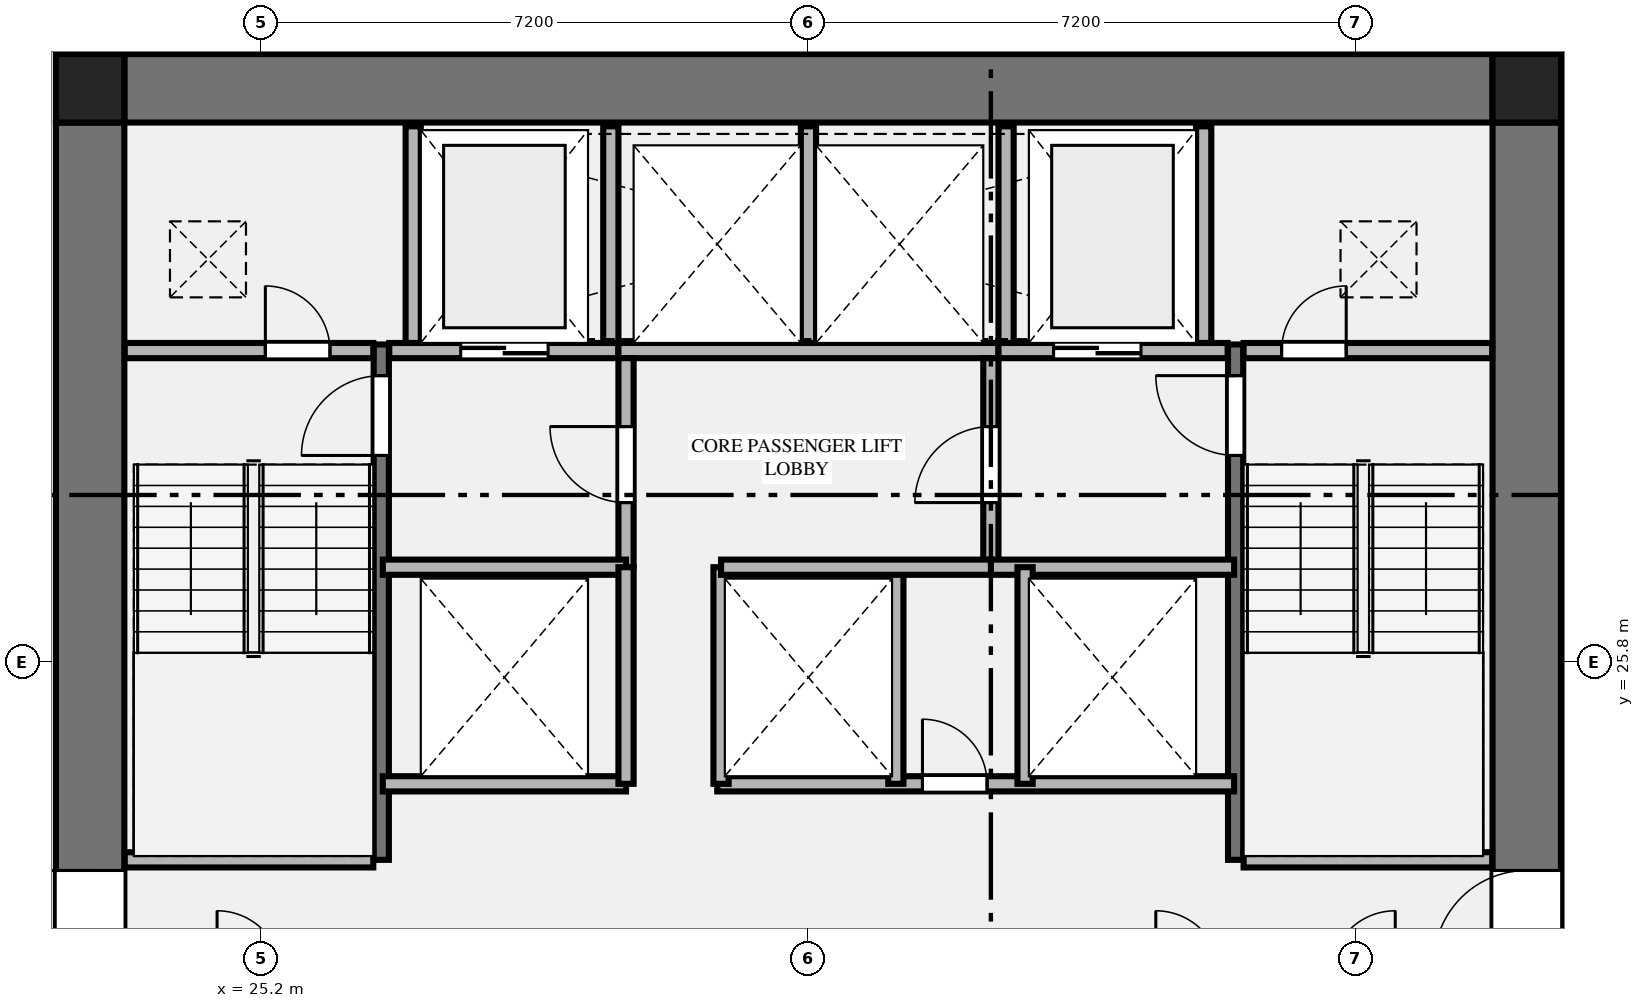
"""IFC4 building model, lengths in metres.
Left out: names, types, materials, properties, quantities, classifications, styles, units other than length and angle.
Written with IfcOpenShell. Run it as: python <this file> out.ifc"""

import sys

from ifc_helpers import new_model, si_unit, direction, frame, frame_2d, origin, origin_2d, place, context, subcontext, project, spatial, rectangle, extrude, element, fill, save


model = new_model("IFC4")
c1 = context("Model", 3, precision=1e-05, world=origin(), true_north=direction((0.0, 1.0)))
c2 = subcontext(c1, "Body", "Model", "MODEL_VIEW")
j1 = project(units=[si_unit("LENGTHUNIT", "METRE"), si_unit("PLANEANGLEUNIT", "RADIAN")], contexts=[c1])
p1 = place(None, origin())
s1 = spatial("IfcSite", under=j1, at=p1, CompositionType="ELEMENT")
p2 = place(p1, origin())
s2 = spatial("IfcBuilding", under=s1, at=p2, CompositionType="ELEMENT")
p3 = place(p2, frame((0.0, 0.0, 24.9)))
s3 = spatial("IfcBuildingStorey", under=s2, at=p3, CompositionType="ELEMENT", Elevation=24.9)
for number, where, z_axis, x_axis in (
    (1, (41.85, 33.35, 0.0), (0.0, 0.0, 1.0), (1.0, 0.0, 0.0)),
    (2, (22.95, 33.35, 0.0), (0.0, 0.0, 1.0), (1.0, 0.0, 0.0)),
):
    element("IfcColumn", number, at=place(p3, frame(where, z_axis=z_axis, x_axis=x_axis)), inside=s3, PredefinedType="COLUMN", context=c2, shape_type="SweptSolid", body=[
        extrude(rectangle(XDim=0.9, YDim=0.9, at=origin_2d()), origin(), (0.0, 0.0, 1.0), 3.55),
    ])
p4 = place(p3, frame((23.4, 33.35, 0.0), z_axis=(0.0, 0.0, 1.0), x_axis=(1.0, 0.0, 0.0)))
e3 = element("IfcWall", 3, at=p4, inside=s3, PredefinedType="SHEAR", context=c2, shape_type="SweptSolid", body=[
    extrude(rectangle(XDim=18.0, YDim=0.9, at=frame_2d((9.0, 0.0))), origin(), (0.0, 0.0, 1.0), 3.33),
])
p5 = place(p3, frame((22.95, 18.9, 0.0), z_axis=(0.0, 0.0, 1.0), x_axis=(0.0, 1.0, 0.0)))
e4 = element("IfcWall", 4, at=p5, inside=s3, PredefinedType="SHEAR", context=c2, shape_type="SweptSolid", body=[
    extrude(rectangle(XDim=14.0, YDim=0.9, at=frame_2d((7.0, 0.0))), origin(), (0.0, 0.0, 1.0), 3.33),
])
p6 = place(p5, frame((2.94, 0.0, 0.0)))
e5 = element("IfcOpeningElement", 5, at=p6, cuts=e4, PredefinedType="OPENING", context=c2, shape_type="SweptSolid", body=[
    extrude(rectangle(XDim=1.22, YDim=2.25, at=frame_2d((0.61, 1.125))), frame((0.0, 0.46, 0.0), z_axis=(0.0, -1.0, 0.0), x_axis=(1.0, 0.0, 0.0)), (0.0, 0.0, 1.0), 0.92),
])
p7 = place(p3, frame((41.85, 18.9, 0.0), z_axis=(0.0, 0.0, 1.0), x_axis=(0.0, 1.0, 0.0)))
e6 = element("IfcWall", 6, at=p7, inside=s3, PredefinedType="SHEAR", context=c2, shape_type="SweptSolid", body=[
    extrude(rectangle(XDim=14.0, YDim=0.9, at=frame_2d((7.0, 0.0))), origin(), (0.0, 0.0, 1.0), 3.33),
])
p8 = place(p7, frame((2.94, 0.0, 0.0)))
e7 = element("IfcOpeningElement", 7, at=p8, cuts=e6, PredefinedType="OPENING", context=c2, shape_type="SweptSolid", body=[
    extrude(rectangle(XDim=1.22, YDim=2.25, at=frame_2d((0.61, 1.125))), frame((0.0, 0.46, 0.0), z_axis=(0.0, -1.0, 0.0), x_axis=(1.0, 0.0, 0.0)), (0.0, 0.0, 1.0), 0.92),
])
p9 = place(p3, frame((26.78, 23.2, 0.0), z_axis=(0.0, 0.0, 1.0), x_axis=(0.0, 1.0, 0.0)))
e8 = element("IfcWall", 8, at=p9, inside=s3, PredefinedType="SHEAR", context=c2, shape_type="SweptSolid", body=[
    extrude(rectangle(XDim=6.78, YDim=0.2, at=frame_2d((3.39, 0.0))), origin(), (0.0, 0.0, 1.0), 3.55),
])
p10 = place(p9, frame((5.32, 0.0, 0.0)))
e9 = element("IfcOpeningElement", 9, at=p10, cuts=e8, PredefinedType="OPENING", context=c2, shape_type="SweptSolid", body=[
    extrude(rectangle(XDim=1.05, YDim=2.15, at=frame_2d((0.525, 1.075))), frame((0.0, 0.11, 0.0), z_axis=(0.0, -1.0, 0.0), x_axis=(1.0, 0.0, 0.0)), (0.0, 0.0, 1.0), 0.22),
])
p11 = place(p3, frame((23.405, 23.2, 0.0), z_axis=(0.0, 0.0, 1.0), x_axis=(1.0, 0.0, 0.0)))
e10 = element("IfcWall", 10, at=p11, inside=s3, PredefinedType="PLUMBINGWALL", context=c2, shape_type="SweptSolid", body=[
    extrude(rectangle(XDim=3.27, YDim=0.2, at=frame_2d((1.635, 0.0))), origin(), (0.0, 0.0, 1.0), 3.33),
])
p12 = place(p3, frame((38.02, 23.2, 0.0), z_axis=(0.0, 0.0, 1.0), x_axis=(0.0, 1.0, 0.0)))
e11 = element("IfcWall", 11, at=p12, inside=s3, PredefinedType="SHEAR", context=c2, shape_type="SweptSolid", body=[
    extrude(rectangle(XDim=6.78, YDim=0.2, at=frame_2d((3.39, 0.0))), origin(), (0.0, 0.0, 1.0), 3.55),
])
p13 = place(p12, frame((5.32, 0.0, 0.0)))
e12 = element("IfcOpeningElement", 12, at=p13, cuts=e11, PredefinedType="OPENING", context=c2, shape_type="SweptSolid", body=[
    extrude(rectangle(XDim=1.05, YDim=2.15, at=frame_2d((0.525, 1.075))), frame((0.0, 0.11, 0.0), z_axis=(0.0, -1.0, 0.0), x_axis=(1.0, 0.0, 0.0)), (0.0, 0.0, 1.0), 0.22),
])
p14 = place(p3, frame((38.125, 23.2, 0.0), z_axis=(0.0, 0.0, 1.0), x_axis=(1.0, 0.0, 0.0)))
e13 = element("IfcWall", 13, at=p14, inside=s3, PredefinedType="PLUMBINGWALL", context=c2, shape_type="SweptSolid", body=[
    extrude(rectangle(XDim=3.27, YDim=0.2, at=frame_2d((1.635, 0.0))), origin(), (0.0, 0.0, 1.0), 3.33),
])
p15 = place(p3, frame((23.405, 29.9, 0.0), z_axis=(0.0, 0.0, 1.0), x_axis=(1.0, 0.0, 0.0)))
e14 = element("IfcWall", 14, at=p15, inside=s3, PredefinedType="PLUMBINGWALL", context=c2, shape_type="SweptSolid", body=[
    extrude(rectangle(XDim=3.27, YDim=0.2, at=frame_2d((1.635, 0.0))), origin(), (0.0, 0.0, 1.0), 3.33),
])
p16 = place(p15, frame((1.85, 0.0, 0.0)))
e15 = element("IfcOpeningElement", 15, at=p16, cuts=e14, PredefinedType="OPENING", context=c2, shape_type="SweptSolid", body=[
    extrude(rectangle(XDim=0.85, YDim=2.05, at=frame_2d((0.425, 1.025))), frame((0.0, 0.11, 0.0), z_axis=(0.0, -1.0, 0.0), x_axis=(1.0, 0.0, 0.0)), (0.0, 0.0, 1.0), 0.22),
])
p17 = place(p3, frame((26.885, 29.9, 0.0), z_axis=(0.0, 0.0, 1.0), x_axis=(1.0, 0.0, 0.0)))
e16 = element("IfcWall", 16, at=p17, inside=s3, PredefinedType="PLUMBINGWALL", context=c2, shape_type="SweptSolid", body=[
    extrude(rectangle(XDim=3.015, YDim=0.2, at=frame_2d((1.507, 0.0))), origin(), (0.0, 0.0, 1.0), 3.33),
])
p18 = place(p17, frame((0.94, 0.0, 0.0)))
e17 = element("IfcOpeningElement", 17, at=p18, cuts=e16, PredefinedType="OPENING", context=c2, shape_type="SweptSolid", body=[
    extrude(rectangle(XDim=1.15, YDim=2.2, at=frame_2d((0.575, 1.1))), frame((0.0, 0.11, 0.0), z_axis=(0.0, -1.0, 0.0), x_axis=(1.0, 0.0, 0.0)), (0.0, 0.0, 1.0), 0.22),
])
p19 = place(p3, frame((29.9, 29.9, 0.0), z_axis=(0.0, 0.0, 1.0), x_axis=(1.0, 0.0, 0.0)))
e18 = element("IfcWall", 18, at=p19, inside=s3, PredefinedType="PLUMBINGWALL", context=c2, shape_type="SweptSolid", body=[
    extrude(rectangle(XDim=5.0, YDim=0.2, at=frame_2d((2.5, 0.0))), origin(), (0.0, 0.0, 1.0), 3.33),
])
p20 = place(p3, frame((34.9, 29.9, 0.0), z_axis=(0.0, 0.0, 1.0), x_axis=(1.0, 0.0, 0.0)))
e19 = element("IfcWall", 19, at=p20, inside=s3, PredefinedType="PLUMBINGWALL", context=c2, shape_type="SweptSolid", body=[
    extrude(rectangle(XDim=3.015, YDim=0.2, at=frame_2d((1.508, 0.0))), origin(), (0.0, 0.0, 1.0), 3.33),
])
p21 = place(p20, frame((0.725, 0.0, 0.0)))
e20 = element("IfcOpeningElement", 20, at=p21, cuts=e19, PredefinedType="OPENING", context=c2, shape_type="SweptSolid", body=[
    extrude(rectangle(XDim=1.15, YDim=2.2, at=frame_2d((0.575, 1.1))), frame((0.0, 0.11, 0.0), z_axis=(0.0, -1.0, 0.0), x_axis=(1.0, 0.0, 0.0)), (0.0, 0.0, 1.0), 0.22),
])
p22 = place(p3, frame((38.125, 29.9, 0.0), z_axis=(0.0, 0.0, 1.0), x_axis=(1.0, 0.0, 0.0)))
e21 = element("IfcWall", 21, at=p22, inside=s3, PredefinedType="PLUMBINGWALL", context=c2, shape_type="SweptSolid", body=[
    extrude(rectangle(XDim=3.27, YDim=0.2, at=frame_2d((1.635, 0.0))), origin(), (0.0, 0.0, 1.0), 3.33),
])
p23 = place(p22, frame((0.5, 0.0, 0.0)))
e22 = element("IfcOpeningElement", 22, at=p23, cuts=e21, PredefinedType="OPENING", context=c2, shape_type="SweptSolid", body=[
    extrude(rectangle(XDim=0.85, YDim=2.05, at=frame_2d((0.425, 1.025))), frame((0.0, 0.11, 0.0), z_axis=(0.0, -1.0, 0.0), x_axis=(1.0, 0.0, 0.0)), (0.0, 0.0, 1.0), 0.22),
])
for number, where, z_axis, x_axis in (
    (23, (27.2, 30.0, 0.0), (0.0, 0.0, 1.0), (0.0, 1.0, 0.0)),
    (24, (29.8, 30.0, 0.0), (0.0, 0.0, 1.0), (0.0, 1.0, 0.0)),
    (25, (32.4, 30.0, 0.0), (0.0, 0.0, 1.0), (0.0, 1.0, 0.0)),
    (26, (35.0, 30.0, 0.0), (0.0, 0.0, 1.0), (0.0, 1.0, 0.0)),
    (27, (37.6, 30.0, 0.0), (0.0, 0.0, 1.0), (0.0, 1.0, 0.0)),
):
    element("IfcWall", number, at=place(p3, frame(where, z_axis=z_axis, x_axis=x_axis)), inside=s3, PredefinedType="PLUMBINGWALL", context=c2, shape_type="SweptSolid", body=[
        extrude(rectangle(XDim=2.85, YDim=0.2, at=frame_2d((1.425, 0.0))), origin(), (0.0, 0.0, 1.0), 3.33),
    ])
p24 = place(p3, frame((30.0, 27.05, 0.0), z_axis=(0.0, 0.0, 1.0), x_axis=(0.0, 1.0, 0.0)))
e28 = element("IfcWall", 28, at=p24, inside=s3, PredefinedType="PLUMBINGWALL", context=c2, shape_type="SweptSolid", body=[
    extrude(rectangle(XDim=2.75, YDim=0.2, at=frame_2d((1.375, 0.0))), origin(), (0.0, 0.0, 1.0), 3.33),
])
p25 = place(p24, frame((0.85, 0.0, 0.0)))
e29 = element("IfcOpeningElement", 29, at=p25, cuts=e28, PredefinedType="OPENING", context=c2, shape_type="SweptSolid", body=[
    extrude(rectangle(XDim=1.0, YDim=2.15, at=frame_2d((0.5, 1.075))), frame((0.0, 0.11, 0.0), z_axis=(0.0, -1.0, 0.0), x_axis=(1.0, 0.0, 0.0)), (0.0, 0.0, 1.0), 0.22),
])
p26 = place(p3, frame((26.8, 27.05, 0.0), z_axis=(0.0, 0.0, 1.0), x_axis=(1.0, 0.0, 0.0)))
e30 = element("IfcWall", 30, at=p26, inside=s3, PredefinedType="PLUMBINGWALL", context=c2, shape_type="SweptSolid", body=[
    extrude(rectangle(XDim=3.2, YDim=0.2, at=frame_2d((1.6, 0.0))), origin(), (0.0, 0.0, 1.0), 3.33),
])
p27 = place(p3, frame((34.8, 27.05, 0.0), z_axis=(0.0, 0.0, 1.0), x_axis=(0.0, 1.0, 0.0)))
e31 = element("IfcWall", 31, at=p27, inside=s3, PredefinedType="PLUMBINGWALL", context=c2, shape_type="SweptSolid", body=[
    extrude(rectangle(XDim=2.75, YDim=0.2, at=frame_2d((1.375, 0.0))), origin(), (0.0, 0.0, 1.0), 3.33),
])
p28 = place(p27, frame((0.85, 0.0, 0.0)))
e32 = element("IfcOpeningElement", 32, at=p28, cuts=e31, PredefinedType="OPENING", context=c2, shape_type="SweptSolid", body=[
    extrude(rectangle(XDim=1.0, YDim=2.15, at=frame_2d((0.5, 1.075))), frame((0.0, 0.11, 0.0), z_axis=(0.0, -1.0, 0.0), x_axis=(1.0, 0.0, 0.0)), (0.0, 0.0, 1.0), 0.22),
])
for number, where, z_axis, x_axis in (
    (33, (34.8, 27.05, 0.0), (0.0, 0.0, 1.0), (1.0, 0.0, 0.0)),
    (34, (26.8, 24.2, 0.0), (0.0, 0.0, 1.0), (1.0, 0.0, 0.0)),
):
    element("IfcWall", number, at=place(p3, frame(where, z_axis=z_axis, x_axis=x_axis)), inside=s3, PredefinedType="PLUMBINGWALL", context=c2, shape_type="SweptSolid", body=[
        extrude(rectangle(XDim=3.2, YDim=0.2, at=frame_2d((1.6, 0.0))), origin(), (0.0, 0.0, 1.0), 3.33),
    ])
p29 = place(p3, frame((30.0, 24.2, 0.0), z_axis=(0.0, 0.0, 1.0), x_axis=(0.0, 1.0, 0.0)))
e35 = element("IfcWall", 35, at=p29, inside=s3, PredefinedType="PLUMBINGWALL", context=c2, shape_type="SweptSolid", body=[
    extrude(rectangle(XDim=2.85, YDim=0.2, at=frame_2d((1.425, 0.0))), origin(), (0.0, 0.0, 1.0), 3.33),
])
p30 = place(p3, frame((31.2, 24.2, 0.0), z_axis=(0.0, 0.0, 1.0), x_axis=(1.0, 0.0, 0.0)))
e36 = element("IfcWall", 36, at=p30, inside=s3, PredefinedType="PLUMBINGWALL", context=c2, shape_type="SweptSolid", body=[
    extrude(rectangle(XDim=6.8, YDim=0.2, at=frame_2d((3.4, 0.0))), origin(), (0.0, 0.0, 1.0), 3.33),
])
p31 = place(p30, frame((2.7, 0.0, 0.0)))
e37 = element("IfcOpeningElement", 37, at=p31, cuts=e36, PredefinedType="OPENING", context=c2, shape_type="SweptSolid", body=[
    extrude(rectangle(XDim=0.85, YDim=2.05, at=frame_2d((0.425, 1.025))), frame((0.0, 0.11, 0.0), z_axis=(0.0, -1.0, 0.0), x_axis=(1.0, 0.0, 0.0)), (0.0, 0.0, 1.0), 0.22),
])
for number, where, z_axis, x_axis in (
    (38, (31.25, 24.2, 0.0), (0.0, 0.0, 1.0), (0.0, 1.0, 0.0)),
    (39, (33.55, 24.2, 0.0), (0.0, 0.0, 1.0), (0.0, 1.0, 0.0)),
    (40, (35.25, 24.2, 0.0), (0.0, 0.0, 1.0), (0.0, 1.0, 0.0)),
):
    element("IfcWall", number, at=place(p3, frame(where, z_axis=z_axis, x_axis=x_axis)), inside=s3, PredefinedType="PLUMBINGWALL", context=c2, shape_type="SweptSolid", body=[
        extrude(rectangle(XDim=2.85, YDim=0.2, at=frame_2d((1.425, 0.0))), origin(), (0.0, 0.0, 1.0), 3.33),
    ])
p32 = place(p3, frame((31.25, 27.05, 0.0), z_axis=(0.0, 0.0, 1.0), x_axis=(1.0, 0.0, 0.0)))
e41 = element("IfcWall", 41, at=p32, inside=s3, PredefinedType="PLUMBINGWALL", context=c2, shape_type="SweptSolid", body=[
    extrude(rectangle(XDim=3.55, YDim=0.2, at=frame_2d((1.775, 0.0))), origin(), (0.0, 0.0, 1.0), 3.33),
])
p33 = place(p6, origin())
e42 = element("IfcDoor", 42, at=p33, inside=s3, OperationType="SINGLE_SWING_RIGHT", PredefinedType="DOOR", context=c2, shape_type="SweptSolid", body=[
    extrude(rectangle(XDim=1.22, YDim=2.25, at=frame_2d((0.61, 1.125))), frame((0.0, 0.025, 0.0), z_axis=(0.0, -1.0, 0.0), x_axis=(1.0, 0.0, 0.0)), (0.0, 0.0, 1.0), 0.05),
])
fill(e5, e42)
p34 = place(p8, origin())
e43 = element("IfcDoor", 43, at=p34, inside=s3, OperationType="SINGLE_SWING_LEFT", PredefinedType="DOOR", context=c2, shape_type="SweptSolid", body=[
    extrude(rectangle(XDim=1.22, YDim=2.25, at=frame_2d((0.61, 1.125))), frame((0.0, 0.025, 0.0), z_axis=(0.0, -1.0, 0.0), x_axis=(1.0, 0.0, 0.0)), (0.0, 0.0, 1.0), 0.05),
])
fill(e7, e43)
p35 = place(p10, origin())
e44 = element("IfcDoor", 44, at=p35, inside=s3, OperationType="SINGLE_SWING_LEFT", PredefinedType="DOOR", context=c2, shape_type="SweptSolid", body=[
    extrude(rectangle(XDim=1.05, YDim=2.15, at=frame_2d((0.525, 1.075))), frame((0.0, 0.025, 0.0), z_axis=(0.0, -1.0, 0.0), x_axis=(1.0, 0.0, 0.0)), (0.0, 0.0, 1.0), 0.05),
])
fill(e9, e44)
p36 = place(p13, origin())
e45 = element("IfcDoor", 45, at=p36, inside=s3, OperationType="SINGLE_SWING_RIGHT", PredefinedType="DOOR", context=c2, shape_type="SweptSolid", body=[
    extrude(rectangle(XDim=1.05, YDim=2.15, at=frame_2d((0.525, 1.075))), frame((0.0, 0.025, 0.0), z_axis=(0.0, -1.0, 0.0), x_axis=(1.0, 0.0, 0.0)), (0.0, 0.0, 1.0), 0.05),
])
fill(e12, e45)
p37 = place(p16, origin())
e46 = element("IfcDoor", 46, at=p37, inside=s3, OperationType="SINGLE_SWING_LEFT", PredefinedType="DOOR", context=c2, shape_type="SweptSolid", body=[
    extrude(rectangle(XDim=0.85, YDim=2.05, at=frame_2d((0.425, 1.025))), frame((0.0, 0.025, 0.0), z_axis=(0.0, -1.0, 0.0), x_axis=(1.0, 0.0, 0.0)), (0.0, 0.0, 1.0), 0.05),
])
fill(e15, e46)
p38 = place(p23, origin())
e47 = element("IfcDoor", 47, at=p38, inside=s3, OperationType="SINGLE_SWING_RIGHT", PredefinedType="DOOR", context=c2, shape_type="SweptSolid", body=[
    extrude(rectangle(XDim=0.85, YDim=2.05, at=frame_2d((0.425, 1.025))), frame((0.0, 0.025, 0.0), z_axis=(0.0, -1.0, 0.0), x_axis=(1.0, 0.0, 0.0)), (0.0, 0.0, 1.0), 0.05),
])
fill(e22, e47)
p39 = place(p18, origin())
e48 = element("IfcDoor", 48, at=p39, inside=s3, OperationType="DOUBLE_DOOR_SLIDING", PredefinedType="DOOR", context=c2, shape_type="SweptSolid", body=[
    extrude(rectangle(XDim=1.15, YDim=2.2, at=frame_2d((0.575, 1.1))), frame((0.0, 0.025, 0.0), z_axis=(0.0, -1.0, 0.0), x_axis=(1.0, 0.0, 0.0)), (0.0, 0.0, 1.0), 0.05),
])
fill(e17, e48)
p40 = place(p21, origin())
e49 = element("IfcDoor", 49, at=p40, inside=s3, OperationType="DOUBLE_DOOR_SLIDING", PredefinedType="DOOR", context=c2, shape_type="SweptSolid", body=[
    extrude(rectangle(XDim=1.15, YDim=2.2, at=frame_2d((0.575, 1.1))), frame((0.0, 0.025, 0.0), z_axis=(0.0, -1.0, 0.0), x_axis=(1.0, 0.0, 0.0)), (0.0, 0.0, 1.0), 0.05),
])
fill(e20, e49)
p41 = place(p25, origin())
e50 = element("IfcDoor", 50, at=p41, inside=s3, OperationType="SINGLE_SWING_RIGHT", PredefinedType="DOOR", context=c2, shape_type="SweptSolid", body=[
    extrude(rectangle(XDim=1.0, YDim=2.15, at=frame_2d((0.5, 1.075))), frame((0.0, 0.025, 0.0), z_axis=(0.0, -1.0, 0.0), x_axis=(1.0, 0.0, 0.0)), (0.0, 0.0, 1.0), 0.05),
])
fill(e29, e50)
p42 = place(p28, origin())
e51 = element("IfcDoor", 51, at=p42, inside=s3, OperationType="SINGLE_SWING_LEFT", PredefinedType="DOOR", context=c2, shape_type="SweptSolid", body=[
    extrude(rectangle(XDim=1.0, YDim=2.15, at=frame_2d((0.5, 1.075))), frame((0.0, 0.025, 0.0), z_axis=(0.0, -1.0, 0.0), x_axis=(1.0, 0.0, 0.0)), (0.0, 0.0, 1.0), 0.05),
])
fill(e32, e51)
p43 = place(p31, origin())
e52 = element("IfcDoor", 52, at=p43, inside=s3, OperationType="SINGLE_SWING_LEFT", PredefinedType="DOOR", context=c2, shape_type="SweptSolid", body=[
    extrude(rectangle(XDim=0.85, YDim=2.05, at=frame_2d((0.425, 1.025))), frame((0.0, 0.025, 0.0), z_axis=(0.0, -1.0, 0.0), x_axis=(1.0, 0.0, 0.0)), (0.0, 0.0, 1.0), 0.05),
])
fill(e37, e52)
save(model, sys.argv[1])
